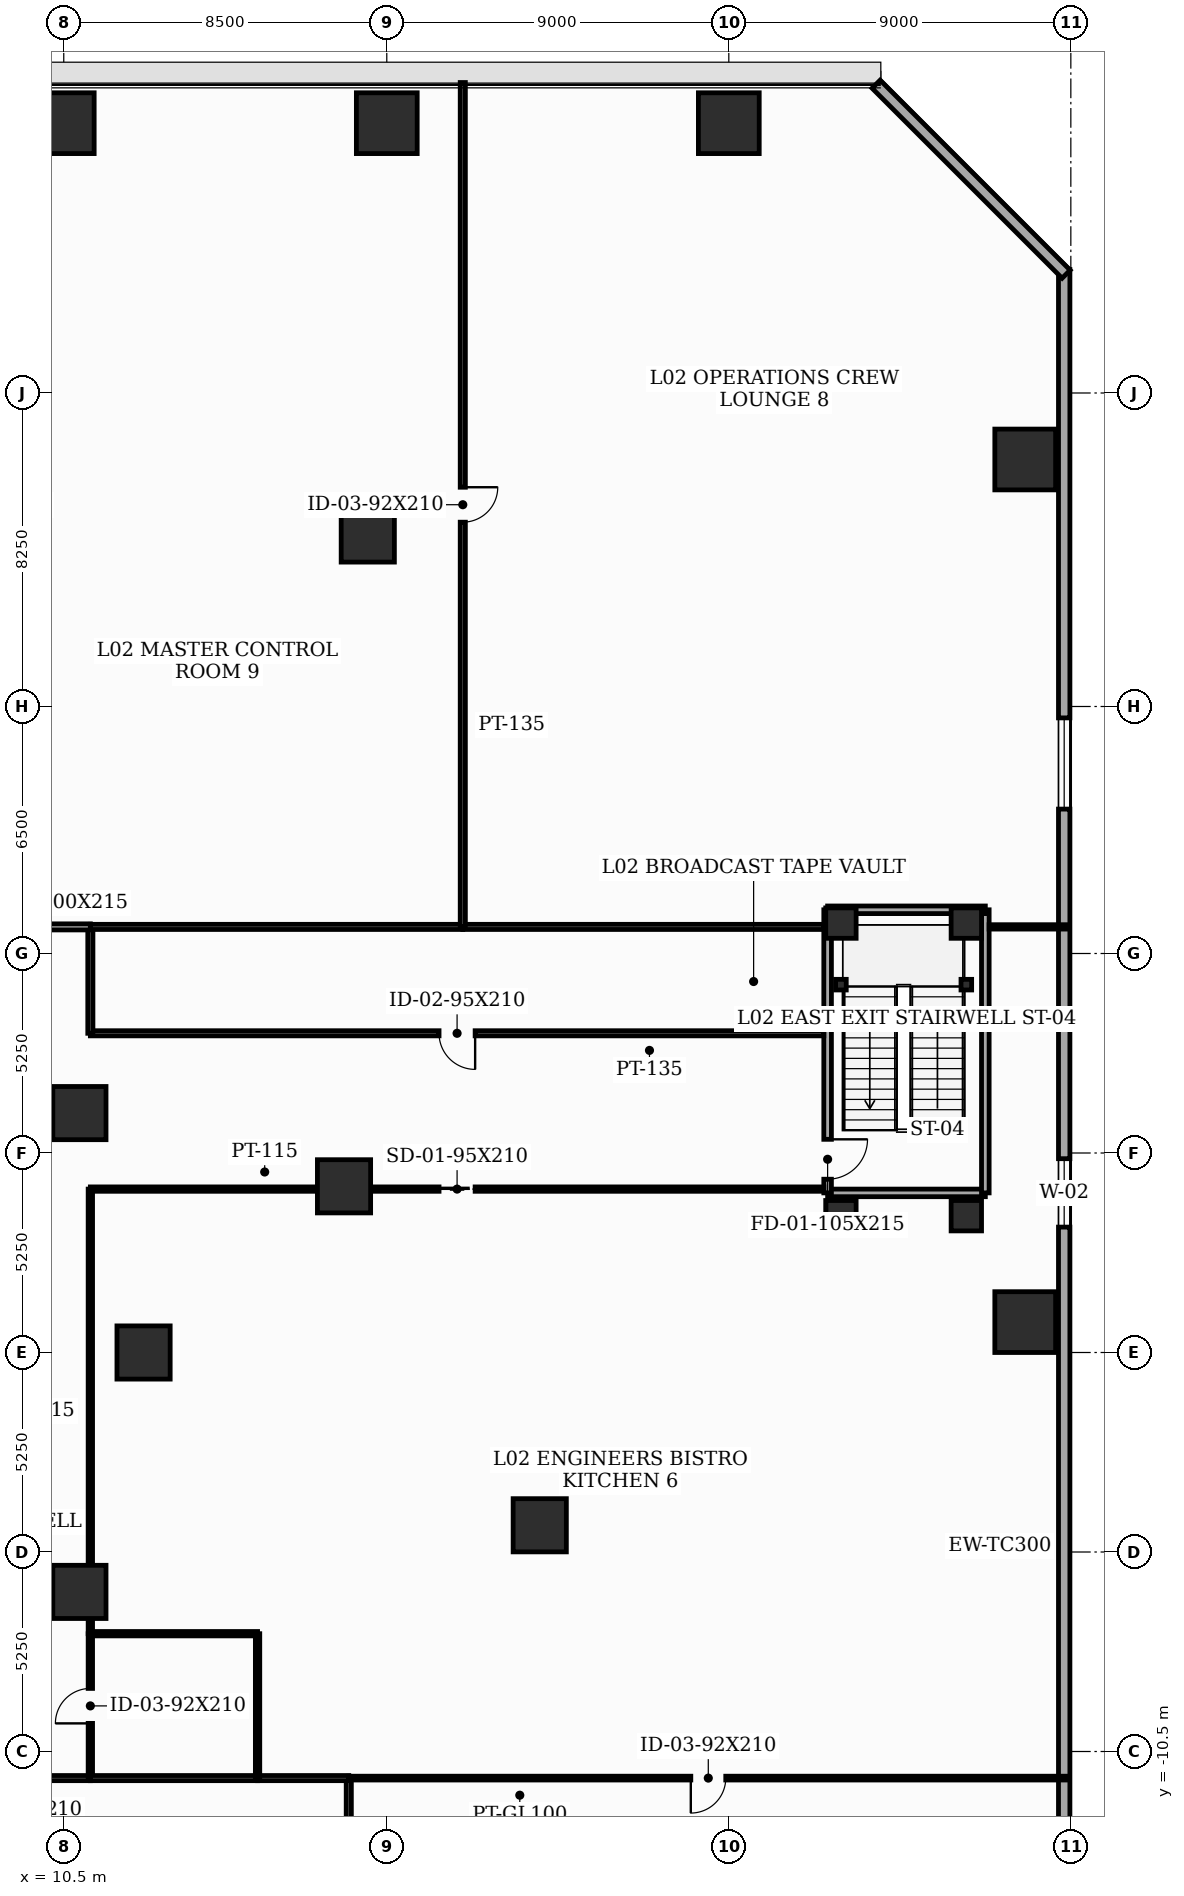
"""IFC4 building model, lengths in metres.
Left out: names, types, materials, properties, quantities, classifications, styles, units other than length and angle.
Written with IfcOpenShell. Run it as: python <this file> out.ifc"""

import sys

from ifc_helpers import new_model, si_unit, direction, frame, frame_2d, origin, origin_2d, place, context, subcontext, project, spatial, rectangle, i_section, extrude, element, fill, save


model = new_model("IFC4")
c1 = context("Model", 3, precision=1e-05, world=origin(), true_north=direction((0.0, 1.0)))
c2 = subcontext(c1, "Body", "Model", "MODEL_VIEW")
j1 = project(units=[si_unit("LENGTHUNIT", "METRE"), si_unit("PLANEANGLEUNIT", "RADIAN")], contexts=[c1])
p1 = place(None, origin())
s1 = spatial("IfcSite", under=j1, at=p1, CompositionType="ELEMENT")
p2 = place(p1, origin())
s2 = spatial("IfcBuilding", under=s1, at=p2, CompositionType="ELEMENT")
p3 = place(p2, frame((0.0, 0.0, 10.4)))
s3 = spatial("IfcBuildingStorey", under=s2, at=p3, CompositionType="ELEMENT", Elevation=10.4)
for number, where, z_axis, x_axis in (
    (1, (12.6, 0.0, 0.0), (0.0, 0.0, 1.0), (1.0, 0.0, 0.0)),
    (2, (10.912, 6.3, 0.0), (0.0, 0.0, 1.0), (1.0, 0.0, 0.0)),
    (3, (10.912, -6.3, 0.0), (0.0, 0.0, 1.0), (1.0, 0.0, 0.0)),
):
    element("IfcColumn", number, at=place(p3, frame(where, z_axis=z_axis, x_axis=x_axis)), inside=s3, PredefinedType="COLUMN", context=c2, shape_type="SweptSolid", body=[
        extrude(rectangle(XDim=1.4, YDim=1.4, at=origin_2d()), origin(), (0.0, 0.0, 1.0), 5.2),
    ])
for number, where, z_axis, x_axis in (
    (4, (35.8, 0.8, 0.0), (0.0, 0.0, 1.0), (1.0, 0.0, 0.0)),
    (5, (35.8, 23.5, 0.0), (0.0, 0.0, 1.0), (1.0, 0.0, 0.0)),
    (6, (28.0, 32.35, 0.0), (0.0, 0.0, 1.0), (1.0, 0.0, 0.0)),
    (7, (19.0, 32.35, 0.0), (0.0, 0.0, 1.0), (1.0, 0.0, 0.0)),
    (8, (10.5, 32.35, 0.0), (0.0, 0.0, 1.0), (1.0, 0.0, 0.0)),
):
    element("IfcColumn", number, at=place(p3, frame(where, z_axis=z_axis, x_axis=x_axis)), inside=s3, PredefinedType="COLUMN", context=c2, shape_type="SweptSolid", body=[
        extrude(rectangle(XDim=1.6, YDim=1.6, at=origin_2d()), origin(), (0.0, 0.0, 1.0), 5.2),
    ])
for number, where, z_axis, x_axis in (
    (9, (18.5, 21.5, 0.0), (0.0, 0.0, 1.0), (1.0, 0.0, 0.0)),
    (10, (23.025, -4.547, 0.0), (0.0, 0.0, 1.0), (1.0, 0.0, 0.0)),
    (11, (17.875, 4.373, 0.0), (0.0, 0.0, 1.0), (1.0, 0.0, 0.0)),
):
    element("IfcColumn", number, at=place(p3, frame(where, z_axis=z_axis, x_axis=x_axis)), inside=s3, PredefinedType="COLUMN", context=c2, shape_type="SweptSolid", body=[
        extrude(rectangle(XDim=1.4, YDim=1.4, at=origin_2d()), origin(), (0.0, 0.0, 1.0), 5.2),
    ])
for number, where, z_axis, x_axis in (
    (12, (30.95, 3.6, 0.0), (0.0, 0.0, 1.0), (1.0, 0.0, 0.0)),
    (13, (34.25, 3.6, 0.0), (0.0, 0.0, 1.0), (1.0, 0.0, 0.0)),
    (14, (34.25, 11.3, 0.0), (0.0, 0.0, 1.0), (1.0, 0.0, 0.0)),
    (15, (30.95, 11.3, 0.0), (0.0, 0.0, 1.0), (1.0, 0.0, 0.0)),
):
    element("IfcColumn", number, at=place(p3, frame(where, z_axis=z_axis, x_axis=x_axis)), inside=s3, PredefinedType="COLUMN", context=c2, shape_type="SweptSolid", body=[
        extrude(rectangle(XDim=0.8, YDim=0.8, at=origin_2d()), origin(), (0.0, 0.0, 1.0), 5.2),
    ])
for number, where, z_axis, x_axis in (
    (16, (30.95, 9.68, 0.0), (0.0, 0.0, 1.0), (1.0, 0.0, 0.0)),
    (17, (34.25, 9.68, 0.0), (0.0, 0.0, 1.0), (1.0, 0.0, 0.0)),
):
    element("IfcColumn", number, at=place(p3, frame(where, z_axis=z_axis, x_axis=x_axis)), inside=s3, PredefinedType="PILASTER", context=c2, shape_type="SweptSolid", body=[
        extrude(i_section(OverallWidth=0.28, OverallDepth=0.28, WebThickness=0.01, FlangeThickness=0.018, at=origin_2d()), origin(), (0.0, 0.0, 1.0), 5.2),
    ])
p4 = place(p3, frame((36.825, -19.5, 0.0), z_axis=(0.0, 0.0, 1.0), x_axis=(0.0, 1.0, 0.0)))
e18 = element("IfcWall", 18, at=p4, inside=s3, PredefinedType="SOLIDWALL", context=c2, shape_type="SweptSolid", body=[
    extrude(rectangle(XDim=48.0, YDim=0.3, at=frame_2d((24.0, 0.0))), origin(), (0.0, 0.0, 1.0), 4.95),
])
p5 = place(p4, frame((3.6, 0.0, 0.9)))
e19 = element("IfcOpeningElement", 19, at=p5, cuts=e18, PredefinedType="OPENING", context=c2, shape_type="SweptSolid", body=[
    extrude(rectangle(XDim=2.4, YDim=1.35, at=frame_2d((1.2, 0.675))), frame((0.0, 0.16, 0.0), z_axis=(0.0, -1.0, 0.0), x_axis=(1.0, 0.0, 0.0)), (0.0, 0.0, 1.0), 0.32),
])
p6 = place(p4, frame((22.8, 0.0, 0.9)))
e20 = element("IfcOpeningElement", 20, at=p6, cuts=e18, PredefinedType="OPENING", context=c2, shape_type="SweptSolid", body=[
    extrude(rectangle(XDim=1.8, YDim=1.35, at=frame_2d((0.9, 0.675))), frame((0.0, 0.16, 0.0), z_axis=(0.0, -1.0, 0.0), x_axis=(1.0, 0.0, 0.0)), (0.0, 0.0, 1.0), 0.32),
])
p7 = place(p4, frame((33.8, 0.0, 0.9)))
e21 = element("IfcOpeningElement", 21, at=p7, cuts=e18, PredefinedType="OPENING", context=c2, shape_type="SweptSolid", body=[
    extrude(rectangle(XDim=2.4, YDim=1.35, at=frame_2d((1.2, 0.675))), frame((0.0, 0.16, 0.0), z_axis=(0.0, -1.0, 0.0), x_axis=(1.0, 0.0, 0.0)), (0.0, 0.0, 1.0), 0.32),
])
p8 = place(p3, frame((36.876, 28.376, 0.0), z_axis=(0.0, 0.0, 1.0), x_axis=(-0.707106781187, 0.707106781187, 0.0)))
e22 = element("IfcWall", 22, at=p8, inside=s3, PredefinedType="SOLIDWALL", context=c2, shape_type="SweptSolid", body=[
    extrude(rectangle(XDim=7.071, YDim=0.3, at=frame_2d((3.536, 0.0))), origin(), (0.0, 0.0, 1.0), 4.95),
])
p9 = place(p3, frame((30.6, 4.2, 0.0), z_axis=(0.0, 0.0, 1.0), x_axis=(1.0, 0.0, 0.0)))
e23 = element("IfcWall", 23, at=p9, inside=s3, PredefinedType="SOLIDWALL", context=c2, shape_type="SweptSolid", body=[
    extrude(rectangle(XDim=4.15, YDim=0.2, at=frame_2d((2.075, 0.0))), origin(), (0.0, 0.0, 1.0), 4.95),
])
p10 = place(p3, frame((34.75, 4.2, 0.0), z_axis=(0.0, 0.0, 1.0), x_axis=(0.0, 1.0, 0.0)))
e24 = element("IfcWall", 24, at=p10, inside=s3, PredefinedType="SOLIDWALL", context=c2, shape_type="SweptSolid", body=[
    extrude(rectangle(XDim=7.45, YDim=0.2, at=frame_2d((3.725, 0.0))), origin(), (0.0, 0.0, 1.0), 4.95),
])
p11 = place(p3, frame((34.75, 11.65, 0.0), z_axis=(0.0, 0.0, 1.0), x_axis=(-1.0, 0.0, 0.0)))
e25 = element("IfcWall", 25, at=p11, inside=s3, PredefinedType="SOLIDWALL", context=c2, shape_type="SweptSolid", body=[
    extrude(rectangle(XDim=4.15, YDim=0.2, at=frame_2d((2.075, 0.0))), origin(), (0.0, 0.0, 1.0), 4.95),
])
p12 = place(p3, frame((30.6, 11.65, 0.0), z_axis=(0.0, 0.0, 1.0), x_axis=(0.0, -1.0, 0.0)))
e26 = element("IfcWall", 26, at=p12, inside=s3, PredefinedType="SOLIDWALL", context=c2, shape_type="SweptSolid", body=[
    extrude(rectangle(XDim=7.45, YDim=0.2, at=frame_2d((3.725, 0.0))), origin(), (0.0, 0.0, 1.0), 4.95),
])
p13 = place(p12, frame((6.04, 0.0, 0.0)))
e27 = element("IfcOpeningElement", 27, at=p13, cuts=e26, PredefinedType="OPENING", context=c2, shape_type="SweptSolid", body=[
    extrude(rectangle(XDim=1.05, YDim=2.15, at=frame_2d((0.525, 1.075))), frame((0.0, 0.11, 0.0), z_axis=(0.0, -1.0, 0.0), x_axis=(1.0, 0.0, 0.0)), (0.0, 0.0, 1.0), 0.22),
])
p14 = place(p3, frame((4.0, -11.2, 0.0), z_axis=(0.0, 0.0, 1.0), x_axis=(1.0, 0.0, 0.0)))
e28 = element("IfcWall", 28, at=p14, inside=s3, PredefinedType="PARTITIONING", context=c2, shape_type="SweptSolid", body=[
    extrude(rectangle(XDim=7.2, YDim=0.135, at=frame_2d((3.6, 0.0))), origin(), (0.0, 0.0, 1.0), 3.435),
])
p15 = place(p14, frame((4.709, 0.0, 0.0)))
e29 = element("IfcOpeningElement", 29, at=p15, cuts=e28, PredefinedType="OPENING", context=c2, shape_type="SweptSolid", body=[
    extrude(rectangle(XDim=0.95, YDim=2.1, at=frame_2d((0.475, 1.05))), frame((0.0, 0.077, 0.0), z_axis=(0.0, -1.0, 0.0), x_axis=(1.0, 0.0, 0.0)), (0.0, 0.0, 1.0), 0.155),
])
p16 = place(p3, frame((11.2, -11.2, 0.0), z_axis=(0.0, 0.0, 1.0), x_axis=(0.0, 1.0, 0.0)))
e30 = element("IfcWall", 30, at=p16, inside=s3, PredefinedType="PARTITIONING", context=c2, shape_type="SweptSolid", body=[
    extrude(rectangle(XDim=3.8, YDim=0.115, at=frame_2d((1.9, 0.0))), origin(), (0.0, 0.0, 1.0), 4.95),
])
p17 = place(p16, frame((1.44, 0.0, 0.0)))
e31 = element("IfcOpeningElement", 31, at=p17, cuts=e30, PredefinedType="OPENING", context=c2, shape_type="SweptSolid", body=[
    extrude(rectangle(XDim=0.92, YDim=2.1, at=frame_2d((0.46, 1.05))), frame((0.0, 0.067, 0.0), z_axis=(0.0, -1.0, 0.0), x_axis=(1.0, 0.0, 0.0)), (0.0, 0.0, 1.0), 0.135),
])
p18 = place(p3, frame((11.2, -7.4, 0.0), z_axis=(0.0, 0.0, 1.0), x_axis=(0.0, 1.0, 0.0)))
e32 = element("IfcWall", 32, at=p18, inside=s3, PredefinedType="PARTITIONING", context=c2, shape_type="SweptSolid", body=[
    extrude(rectangle(XDim=11.7, YDim=0.115, at=frame_2d((5.85, 0.0))), origin(), (0.0, 0.0, 1.0), 4.235),
])
p19 = place(p3, frame((11.2, 4.3, 0.0), z_axis=(0.0, 0.0, 1.0), x_axis=(1.0, 0.0, 0.0)))
e33 = element("IfcWall", 33, at=p19, inside=s3, PredefinedType="PARTITIONING", context=c2, shape_type="SweptSolid", body=[
    extrude(rectangle(XDim=19.3, YDim=0.115, at=frame_2d((9.65, 0.0))), origin(), (0.0, 0.0, 1.0), 3.435),
])
p20 = place(p19, frame((9.175, 0.0, 0.0)))
e34 = element("IfcOpeningElement", 34, at=p20, cuts=e33, PredefinedType="OPENING", context=c2, shape_type="SweptSolid", body=[
    extrude(rectangle(XDim=0.95, YDim=2.1, at=frame_2d((0.475, 1.05))), frame((0.0, 0.067, 0.0), z_axis=(0.0, -1.0, 0.0), x_axis=(1.0, 0.0, 0.0)), (0.0, 0.0, 1.0), 0.135),
])
p21 = place(p3, frame((30.5, 8.4, 0.0), z_axis=(0.0, 0.0, 1.0), x_axis=(-1.0, 0.0, 0.0)))
e35 = element("IfcWall", 35, at=p21, inside=s3, PredefinedType="PARTITIONING", context=c2, shape_type="SweptSolid", body=[
    extrude(rectangle(XDim=19.3, YDim=0.135, at=frame_2d((9.65, 0.0))), origin(), (0.0, 0.0, 1.0), 4.235),
])
p22 = place(p21, frame((9.175, 0.0, 0.0)))
e36 = element("IfcOpeningElement", 36, at=p22, cuts=e35, PredefinedType="OPENING", context=c2, shape_type="SweptSolid", body=[
    extrude(rectangle(XDim=0.95, YDim=2.1, at=frame_2d((0.475, 1.05))), frame((0.0, 0.077, 0.0), z_axis=(0.0, -1.0, 0.0), x_axis=(1.0, 0.0, 0.0)), (0.0, 0.0, 1.0), 0.155),
])
p23 = place(p3, frame((11.2, 8.4, 0.0), z_axis=(0.0, 0.0, 1.0), x_axis=(0.0, 1.0, 0.0)))
e37 = element("IfcWall", 37, at=p23, inside=s3, PredefinedType="PARTITIONING", context=c2, shape_type="SweptSolid", body=[
    extrude(rectangle(XDim=2.8, YDim=0.135, at=frame_2d((1.4, 0.0))), origin(), (0.0, 0.0, 1.0), 4.95),
])
p24 = place(p3, frame((11.2, 11.2, 0.0), z_axis=(0.0, 0.0, 1.0), x_axis=(-1.0, 0.0, 0.0)))
e38 = element("IfcWall", 38, at=p24, inside=s3, PredefinedType="PARTITIONING", context=c2, shape_type="SweptSolid", body=[
    extrude(rectangle(XDim=3.2, YDim=0.16, at=frame_2d((1.6, 0.0))), origin(), (0.0, 0.0, 1.0), 4.95),
])
p25 = place(p24, frame((1.1, 0.0, 0.0)))
e39 = element("IfcOpeningElement", 39, at=p25, cuts=e38, PredefinedType="OPENING", context=c2, shape_type="SweptSolid", body=[
    extrude(rectangle(XDim=1.0, YDim=2.15, at=frame_2d((0.5, 1.075))), frame((0.0, 0.09, 0.0), z_axis=(0.0, -1.0, 0.0), x_axis=(1.0, 0.0, 0.0)), (0.0, 0.0, 1.0), 0.18),
])
p26 = place(p3, frame((15.6, -11.2, 0.0), z_axis=(0.0, 0.0, 1.0), x_axis=(-1.0, 0.0, 0.0)))
e40 = element("IfcWall", 40, at=p26, inside=s3, PredefinedType="PARTITIONING", context=c2, shape_type="SweptSolid", body=[
    extrude(rectangle(XDim=4.4, YDim=0.135, at=frame_2d((2.2, 0.0))), origin(), (0.0, 0.0, 1.0), 4.95),
])
p27 = place(p3, frame((18.0, -24.42, 0.0), z_axis=(0.0, 0.0, 1.0), x_axis=(0.0, 1.0, 0.0)))
e41 = element("IfcWall", 41, at=p27, inside=s3, PredefinedType="PARTITIONING", context=c2, shape_type="SweptSolid", body=[
    extrude(rectangle(XDim=13.22, YDim=0.135, at=frame_2d((6.61, 0.0))), origin(), (0.0, 0.0, 1.0), 3.435),
])
p28 = place(p3, frame((18.0, -11.2, 0.0), z_axis=(0.0, 0.0, 1.0), x_axis=(-1.0, 0.0, 0.0)))
e42 = element("IfcWall", 42, at=p28, inside=s3, PredefinedType="PARTITIONING", context=c2, shape_type="SweptSolid", body=[
    extrude(rectangle(XDim=2.4, YDim=0.135, at=frame_2d((1.2, 0.0))), origin(), (0.0, 0.0, 1.0), 4.95),
])
p29 = place(p3, frame((15.6, -11.2, 0.0), z_axis=(0.0, 0.0, 1.0), x_axis=(0.0, 1.0, 0.0)))
e43 = element("IfcWall", 43, at=p29, inside=s3, PredefinedType="PARTITIONING", context=c2, shape_type="SweptSolid", body=[
    extrude(rectangle(XDim=3.8, YDim=0.115, at=frame_2d((1.9, 0.0))), origin(), (0.0, 0.0, 1.0), 4.95),
])
p30 = place(p3, frame((15.6, -7.4, 0.0), z_axis=(0.0, 0.0, 1.0), x_axis=(-1.0, 0.0, 0.0)))
e44 = element("IfcWall", 44, at=p30, inside=s3, PredefinedType="PARTITIONING", context=c2, shape_type="SweptSolid", body=[
    extrude(rectangle(XDim=4.4, YDim=0.115, at=frame_2d((2.2, 0.0))), origin(), (0.0, 0.0, 1.0), 4.95),
])
p31 = place(p3, frame((36.92, -11.2, 0.0), z_axis=(0.0, 0.0, 1.0), x_axis=(-1.0, 0.0, 0.0)))
e45 = element("IfcWall", 45, at=p31, inside=s3, PredefinedType="MOVABLE", context=c2, shape_type="SweptSolid", body=[
    extrude(rectangle(XDim=18.92, YDim=0.1, at=frame_2d((9.46, 0.0))), origin(), (0.0, 0.0, 1.0), 3.435),
])
p32 = place(p31, frame((9.0, 0.0, 0.0)))
e46 = element("IfcOpeningElement", 46, at=p32, cuts=e45, PredefinedType="OPENING", context=c2, shape_type="SweptSolid", body=[
    extrude(rectangle(XDim=0.92, YDim=2.1, at=frame_2d((0.46, 1.05))), frame((0.0, 0.06, 0.0), z_axis=(0.0, -1.0, 0.0), x_axis=(1.0, 0.0, 0.0)), (0.0, 0.0, 1.0), 0.12),
])
p33 = place(p3, frame((36.92, 11.2, 0.0), z_axis=(0.0, 0.0, 1.0), x_axis=(-1.0, 0.0, 0.0)))
e47 = element("IfcWall", 47, at=p33, inside=s3, PredefinedType="PARTITIONING", context=c2, shape_type="SweptSolid", body=[
    extrude(rectangle(XDim=2.07, YDim=0.115, at=frame_2d((1.035, 0.0))), origin(), (0.0, 0.0, 1.0), 4.235),
])
p34 = place(p3, frame((30.5, 11.2, 0.0), z_axis=(0.0, 0.0, 1.0), x_axis=(-1.0, 0.0, 0.0)))
e48 = element("IfcWall", 48, at=p34, inside=s3, PredefinedType="PARTITIONING", context=c2, shape_type="SweptSolid", body=[
    extrude(rectangle(XDim=9.5, YDim=0.135, at=frame_2d((4.75, 0.0))), origin(), (0.0, 0.0, 1.0), 4.95),
])
p35 = place(p3, frame((21.0, 11.2, 0.0), z_axis=(0.0, 0.0, 1.0), x_axis=(-1.0, 0.0, 0.0)))
e49 = element("IfcWall", 49, at=p35, inside=s3, PredefinedType="PARTITIONING", context=c2, shape_type="SweptSolid", body=[
    extrude(rectangle(XDim=9.8, YDim=0.135, at=frame_2d((4.9, 0.0))), origin(), (0.0, 0.0, 1.0), 4.235),
])
p36 = place(p3, frame((21.0, 33.42, 0.0), z_axis=(0.0, 0.0, 1.0), x_axis=(0.0, -1.0, 0.0)))
e50 = element("IfcWall", 50, at=p36, inside=s3, PredefinedType="PARTITIONING", context=c2, shape_type="SweptSolid", body=[
    extrude(rectangle(XDim=22.22, YDim=0.135, at=frame_2d((11.11, 0.0))), origin(), (0.0, 0.0, 1.0), 3.435),
])
p37 = place(p36, frame((10.65, 0.0, 0.0)))
e51 = element("IfcOpeningElement", 51, at=p37, cuts=e50, PredefinedType="OPENING", context=c2, shape_type="SweptSolid", body=[
    extrude(rectangle(XDim=0.92, YDim=2.1, at=frame_2d((0.46, 1.05))), frame((0.0, 0.077, 0.0), z_axis=(0.0, -1.0, 0.0), x_axis=(1.0, 0.0, 0.0)), (0.0, 0.0, 1.0), 0.155),
])
p38 = place(p6, origin())
e52 = element("IfcWindow", 52, at=p38, inside=s3, PartitioningType="SINGLE_PANEL", PredefinedType="WINDOW", context=c2, shape_type="SweptSolid", body=[
    extrude(rectangle(XDim=1.8, YDim=1.35, at=frame_2d((0.9, 0.675))), frame((0.0, 0.03, 0.0), z_axis=(0.0, -1.0, 0.0), x_axis=(1.0, 0.0, 0.0)), (0.0, 0.0, 1.0), 0.06),
])
fill(e20, e52)
p39 = place(p7, origin())
e53 = element("IfcWindow", 53, at=p39, inside=s3, PartitioningType="SINGLE_PANEL", PredefinedType="WINDOW", context=c2, shape_type="SweptSolid", body=[
    extrude(rectangle(XDim=2.4, YDim=1.35, at=frame_2d((1.2, 0.675))), frame((0.0, 0.03, 0.0), z_axis=(0.0, -1.0, 0.0), x_axis=(1.0, 0.0, 0.0)), (0.0, 0.0, 1.0), 0.06),
])
fill(e21, e53)
p40 = place(p13, origin())
e54 = element("IfcDoor", 54, at=p40, inside=s3, OperationType="SINGLE_SWING_LEFT", PredefinedType="DOOR", context=c2, shape_type="SweptSolid", body=[
    extrude(rectangle(XDim=1.05, YDim=2.15, at=frame_2d((0.525, 1.075))), frame((0.0, 0.025, 0.0), z_axis=(0.0, -1.0, 0.0), x_axis=(1.0, 0.0, 0.0)), (0.0, 0.0, 1.0), 0.05),
])
fill(e27, e54)
p41 = place(p17, origin())
e55 = element("IfcDoor", 55, at=p41, inside=s3, OperationType="SINGLE_SWING_LEFT", PredefinedType="DOOR", context=c2, shape_type="SweptSolid", body=[
    extrude(rectangle(XDim=0.92, YDim=2.1, at=frame_2d((0.46, 1.05))), frame((0.0, 0.025, 0.0), z_axis=(0.0, -1.0, 0.0), x_axis=(1.0, 0.0, 0.0)), (0.0, 0.0, 1.0), 0.05),
])
fill(e31, e55)
p42 = place(p20, origin())
e56 = element("IfcDoor", 56, at=p42, inside=s3, OperationType="SLIDING_TO_LEFT", PredefinedType="DOOR", context=c2, shape_type="SweptSolid", body=[
    extrude(rectangle(XDim=0.95, YDim=2.1, at=frame_2d((0.475, 1.05))), frame((0.0, 0.025, 0.0), z_axis=(0.0, -1.0, 0.0), x_axis=(1.0, 0.0, 0.0)), (0.0, 0.0, 1.0), 0.05),
])
fill(e34, e56)
p43 = place(p22, origin())
e57 = element("IfcDoor", 57, at=p43, inside=s3, OperationType="SINGLE_SWING_LEFT", PredefinedType="DOOR", context=c2, shape_type="SweptSolid", body=[
    extrude(rectangle(XDim=0.95, YDim=2.1, at=frame_2d((0.475, 1.05))), frame((0.0, 0.025, 0.0), z_axis=(0.0, -1.0, 0.0), x_axis=(1.0, 0.0, 0.0)), (0.0, 0.0, 1.0), 0.05),
])
fill(e36, e57)
p44 = place(p32, origin())
e58 = element("IfcDoor", 58, at=p44, inside=s3, OperationType="SINGLE_SWING_RIGHT", PredefinedType="DOOR", context=c2, shape_type="SweptSolid", body=[
    extrude(rectangle(XDim=0.92, YDim=2.1, at=frame_2d((0.46, 1.05))), frame((0.0, 0.025, 0.0), z_axis=(0.0, -1.0, 0.0), x_axis=(1.0, 0.0, 0.0)), (0.0, 0.0, 1.0), 0.05),
])
fill(e46, e58)
p45 = place(p37, origin())
e59 = element("IfcDoor", 59, at=p45, inside=s3, OperationType="SINGLE_SWING_LEFT", PredefinedType="DOOR", context=c2, shape_type="SweptSolid", body=[
    extrude(rectangle(XDim=0.92, YDim=2.1, at=frame_2d((0.46, 1.05))), frame((0.0, 0.025, 0.0), z_axis=(0.0, -1.0, 0.0), x_axis=(1.0, 0.0, 0.0)), (0.0, 0.0, 1.0), 0.05),
])
fill(e51, e59)
save(model, sys.argv[1])
